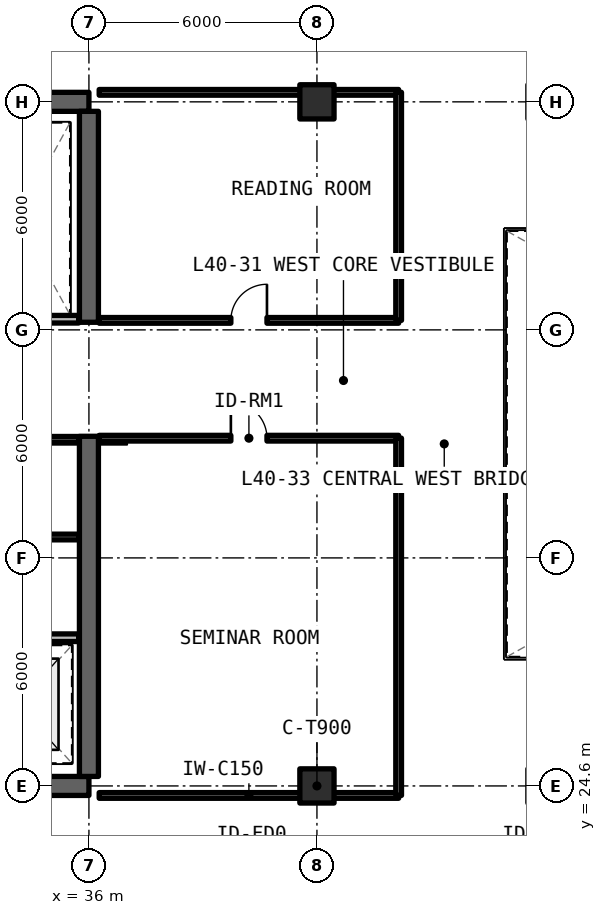
"""IFC4 building model, lengths in metres.
Left out: names, types, materials, properties, quantities, classifications, styles, units other than length and angle.
Written with IfcOpenShell. Run it as: python <this file> out.ifc"""

import sys

from ifc_helpers import new_model, si_unit, direction, frame, frame_2d, origin, origin_2d, place, context, subcontext, project, spatial, rectangle, extrude, element, fill, save


model = new_model("IFC4")
c1 = context("Model", 3, precision=1e-05, world=origin(), true_north=direction((0.0, 1.0)))
c2 = subcontext(c1, "Body", "Model", "MODEL_VIEW")
j1 = project(units=[si_unit("LENGTHUNIT", "METRE"), si_unit("PLANEANGLEUNIT", "RADIAN")], contexts=[c1])
p1 = place(None, origin())
s1 = spatial("IfcSite", under=j1, at=p1, CompositionType="ELEMENT")
p2 = place(p1, origin())
s2 = spatial("IfcBuilding", under=s1, at=p2, CompositionType="ELEMENT")
p3 = place(p2, frame((0.0, 0.0, 145.2)))
s3 = spatial("IfcBuildingStorey", under=s2, at=p3, CompositionType="ELEMENT", Elevation=145.2)
for number, where, z_axis, x_axis in (
    (1, (24.0, 24.6, 0.0), (0.0, 0.0, 1.0), (1.0, 0.0, 0.0)),
    (2, (36.0, 42.6, 0.0), (0.0, 0.0, 1.0), (-1.0, 0.0, 0.0)),
):
    element("IfcWall", number, at=place(p3, frame(where, z_axis=z_axis, x_axis=x_axis)), inside=s3, PredefinedType="SHEAR", context=c2, shape_type="SweptSolid", body=[
        extrude(rectangle(XDim=12.0, YDim=0.5, at=frame_2d((6.0, 0.0))), origin(), (0.0, 0.0, 1.0), 3.3),
    ])
p4 = place(p3, frame((36.0, 24.85, 0.0), z_axis=(0.0, 0.0, 1.0), x_axis=(0.0, 1.0, 0.0)))
e3 = element("IfcWall", 3, at=p4, inside=s3, PredefinedType="SHEAR", context=c2, shape_type="SweptSolid", body=[
    extrude(rectangle(XDim=8.95, YDim=0.5, at=frame_2d((4.475, 0.0))), origin(), (0.0, 0.0, 1.0), 3.3),
])
p5 = place(p3, frame((36.0, 36.8, 0.0), z_axis=(0.0, 0.0, 1.0), x_axis=(0.0, 1.0, 0.0)))
e4 = element("IfcWall", 4, at=p5, inside=s3, PredefinedType="SHEAR", context=c2, shape_type="SweptSolid", body=[
    extrude(rectangle(XDim=5.55, YDim=0.5, at=frame_2d((2.775, 0.0))), origin(), (0.0, 0.0, 1.0), 3.3),
])
for number, where, z_axis, x_axis in (
    (5, (42.0, 24.6, 0.0), (0.0, 0.0, 1.0), (1.0, 0.0, 0.0)),
    (6, (42.0, 42.6, 0.0), (0.0, 0.0, 1.0), (1.0, 0.0, 0.0)),
):
    element("IfcColumn", number, at=place(p3, frame(where, z_axis=z_axis, x_axis=x_axis)), inside=s3, PredefinedType="COLUMN", context=c2, shape_type="SweptSolid", body=[
        extrude(rectangle(XDim=0.9, YDim=0.9, at=origin_2d()), origin(), (0.0, 0.0, 1.0), 3.3),
    ])
p6 = place(p3, frame((28.22, 28.5, 0.0), z_axis=(0.0, 0.0, 1.0), x_axis=(1.0, 0.0, 0.0)))
e7 = element("IfcWall", 7, at=p6, inside=s3, PredefinedType="SOLIDWALL", context=c2, shape_type="SweptSolid", body=[
    extrude(rectangle(XDim=7.51, YDim=0.2, at=frame_2d((3.755, 0.0))), origin(), (0.0, 0.0, 1.0), 2.35),
])
p7 = place(p6, frame((2.98, 0.0, 0.0)))
e8 = element("IfcOpeningElement", 8, at=p7, cuts=e7, PredefinedType="OPENING", context=c2, shape_type="SweptSolid", body=[
    extrude(rectangle(XDim=1.0, YDim=2.15, at=frame_2d((0.5, 1.075))), frame((0.0, 0.11, 0.0), z_axis=(0.0, -1.0, 0.0), x_axis=(1.0, 0.0, 0.0)), (0.0, 0.0, 1.0), 0.22),
])
for number, where, z_axis, x_axis in (
    (9, (32.68, 31.15, 0.0), (0.0, 0.0, 1.0), (1.0, 0.0, 0.0)),
    (10, (32.68, 33.72, 0.0), (0.0, 0.0, 1.0), (1.0, 0.0, 0.0)),
):
    element("IfcWall", number, at=place(p3, frame(where, z_axis=z_axis, x_axis=x_axis)), inside=s3, PredefinedType="SOLIDWALL", context=c2, shape_type="SweptSolid", body=[
        extrude(rectangle(XDim=3.05, YDim=0.15, at=frame_2d((1.525, 0.0))), origin(), (0.0, 0.0, 1.0), 2.35),
    ])
p8 = place(p3, frame((32.68, 36.88, 0.0), z_axis=(0.0, 0.0, 1.0), x_axis=(1.0, 0.0, 0.0)))
e11 = element("IfcWall", 11, at=p8, inside=s3, PredefinedType="SOLIDWALL", context=c2, shape_type="SweptSolid", body=[
    extrude(rectangle(XDim=3.05, YDim=0.2, at=frame_2d((1.525, 0.0))), origin(), (0.0, 0.0, 1.0), 2.35),
])
p9 = place(p3, frame((36.27, 24.35, 0.0), z_axis=(0.0, 0.0, 1.0), x_axis=(1.0, 0.0, 0.0)))
e12 = element("IfcWall", 12, at=p9, inside=s3, PredefinedType="SOLIDWALL", context=c2, shape_type="SweptSolid", body=[
    extrude(rectangle(XDim=7.88, YDim=0.15, at=frame_2d((3.94, 0.0))), origin(), (0.0, 0.0, 1.0), 2.35),
])
p10 = place(p3, frame((36.27, 33.75, 0.0), z_axis=(0.0, 0.0, 1.0), x_axis=(1.0, 0.0, 0.0)))
e13 = element("IfcWall", 13, at=p10, inside=s3, PredefinedType="SOLIDWALL", context=c2, shape_type="SweptSolid", body=[
    extrude(rectangle(XDim=7.88, YDim=0.15, at=frame_2d((3.94, 0.0))), origin(), (0.0, 0.0, 1.0), 2.35),
])
p11 = place(p10, frame((3.465, 0.0, 0.0)))
e14 = element("IfcOpeningElement", 14, at=p11, cuts=e13, PredefinedType="OPENING", context=c2, shape_type="SweptSolid", body=[
    extrude(rectangle(XDim=0.95, YDim=2.15, at=frame_2d((0.475, 1.075))), frame((0.0, 0.085, 0.0), z_axis=(0.0, -1.0, 0.0), x_axis=(1.0, 0.0, 0.0)), (0.0, 0.0, 1.0), 0.17),
])
p12 = place(p3, frame((44.15, 24.35, 0.0), z_axis=(0.0, 0.0, 1.0), x_axis=(0.0, 1.0, 0.0)))
e15 = element("IfcWall", 15, at=p12, inside=s3, PredefinedType="SOLIDWALL", context=c2, shape_type="SweptSolid", body=[
    extrude(rectangle(XDim=9.4, YDim=0.15, at=frame_2d((4.7, 0.0))), origin(), (0.0, 0.0, 1.0), 2.35),
])
p13 = place(p3, frame((36.27, 36.85, 0.0), z_axis=(0.0, 0.0, 1.0), x_axis=(1.0, 0.0, 0.0)))
e16 = element("IfcWall", 16, at=p13, inside=s3, PredefinedType="SOLIDWALL", context=c2, shape_type="SweptSolid", body=[
    extrude(rectangle(XDim=7.88, YDim=0.15, at=frame_2d((3.94, 0.0))), origin(), (0.0, 0.0, 1.0), 2.35),
])
p14 = place(p13, frame((3.465, 0.0, 0.0)))
e17 = element("IfcOpeningElement", 17, at=p14, cuts=e16, PredefinedType="OPENING", context=c2, shape_type="SweptSolid", body=[
    extrude(rectangle(XDim=0.95, YDim=2.15, at=frame_2d((0.475, 1.075))), frame((0.0, 0.085, 0.0), z_axis=(0.0, -1.0, 0.0), x_axis=(1.0, 0.0, 0.0)), (0.0, 0.0, 1.0), 0.17),
])
p15 = place(p3, frame((36.27, 42.85, 0.0), z_axis=(0.0, 0.0, 1.0), x_axis=(1.0, 0.0, 0.0)))
e18 = element("IfcWall", 18, at=p15, inside=s3, PredefinedType="SOLIDWALL", context=c2, shape_type="SweptSolid", body=[
    extrude(rectangle(XDim=7.88, YDim=0.15, at=frame_2d((3.94, 0.0))), origin(), (0.0, 0.0, 1.0), 2.35),
])
p16 = place(p3, frame((44.15, 36.85, 0.0), z_axis=(0.0, 0.0, 1.0), x_axis=(0.0, 1.0, 0.0)))
e19 = element("IfcWall", 19, at=p16, inside=s3, PredefinedType="SOLIDWALL", context=c2, shape_type="SweptSolid", body=[
    extrude(rectangle(XDim=6.0, YDim=0.15, at=frame_2d((3.0, 0.0))), origin(), (0.0, 0.0, 1.0), 2.35),
])
p17 = place(p11, origin())
e20 = element("IfcDoor", 20, at=p17, inside=s3, OperationType="SINGLE_SWING_LEFT", PredefinedType="DOOR", context=c2, shape_type="SweptSolid", body=[
    extrude(rectangle(XDim=0.95, YDim=2.15, at=frame_2d((0.475, 1.075))), frame((0.0, 0.025, 0.0), z_axis=(0.0, -1.0, 0.0), x_axis=(1.0, 0.0, 0.0)), (0.0, 0.0, 1.0), 0.05),
])
fill(e14, e20)
p18 = place(p14, origin())
e21 = element("IfcDoor", 21, at=p18, inside=s3, OperationType="SINGLE_SWING_RIGHT", PredefinedType="DOOR", context=c2, shape_type="SweptSolid", body=[
    extrude(rectangle(XDim=0.95, YDim=2.15, at=frame_2d((0.475, 1.075))), frame((0.0, 0.025, 0.0), z_axis=(0.0, -1.0, 0.0), x_axis=(1.0, 0.0, 0.0)), (0.0, 0.0, 1.0), 0.05),
])
fill(e17, e21)
save(model, sys.argv[1])
